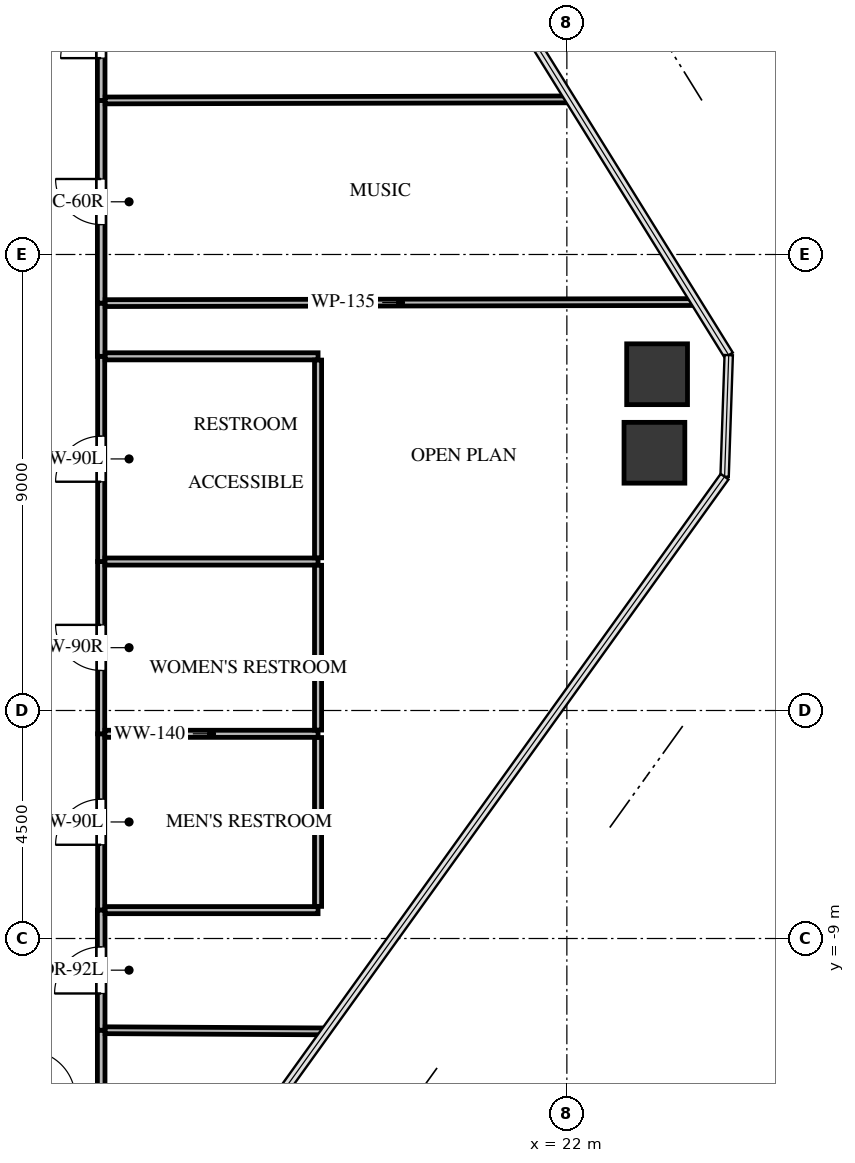
"""IFC4 building model, lengths in metres.
Left out: names, types, materials, properties, quantities, classifications, styles, units other than length and angle.
Written with IfcOpenShell. Run it as: python <this file> out.ifc"""

import sys

from ifc_helpers import new_model, si_unit, direction, frame, frame_2d, origin, origin_2d, place, context, subcontext, project, spatial, rectangle, extrude, source, transform, mapped, element, fill, save


model = new_model("IFC4")
c1 = context("Model", 3, precision=1e-05, world=origin(), true_north=direction((0.0, 1.0)))
c2 = subcontext(c1, "Body", "Model", "MODEL_VIEW")
j1 = project(units=[si_unit("LENGTHUNIT", "METRE"), si_unit("PLANEANGLEUNIT", "RADIAN")], contexts=[c1])
p1 = place(None, origin())
s1 = spatial("IfcSite", under=j1, at=p1, CompositionType="ELEMENT")
p2 = place(p1, origin())
s2 = spatial("IfcBuilding", under=s1, at=p2, CompositionType="ELEMENT")
p3 = place(p2, frame((0.0, 0.0, 123.9)))
s3 = spatial("IfcBuildingStorey", under=s2, at=p3, CompositionType="ELEMENT", Elevation=123.9)
m1 = source(origin(), c2, "Body", "SweptSolid", [
    extrude(rectangle(XDim=1.2, YDim=1.2, at=origin_2d()), origin(), (0.0, 0.0, 1.0), 3.3),
])
for number, where, z_axis, x_axis in (
    (1, (23.781, 2.137, -0.24), (0.0, 0.0, 1.0), (1.0, 0.0, 0.0)),
    (2, (23.728, 0.587, -0.24), (0.0, 0.0, 1.0), (1.0, 0.0, 0.0)),
):
    element("IfcColumn", number, at=place(p3, frame(where, z_axis=z_axis, x_axis=x_axis)), inside=s3, PredefinedType="COLUMN", context=c2, shape_type="MappedRepresentation", body=[
        mapped(m1, transform((0.0, 0.0, 0.0), x_axis=(1.0, 0.0, 0.0), y_axis=(0.0, 1.0, 0.0), z_axis=(0.0, 0.0, 1.0), scale=1.0)),
    ])
p4 = place(p3, frame((12.81, -8.44, 0.0), z_axis=(0.0, 0.0, 1.0), x_axis=(0.0, 1.0, 0.0)))
e3 = element("IfcWall", 3, at=p4, inside=s3, PredefinedType="PARTITIONING", context=c2, shape_type="SweptSolid", body=[
    extrude(rectangle(XDim=3.48, YDim=0.14, at=frame_2d((1.74, 0.0))), origin(), (0.0, 0.0, 1.0), 3.045),
])
p5 = place(p4, frame((1.29, 0.0, 0.0)))
e4 = element("IfcOpeningElement", 4, at=p5, cuts=e3, PredefinedType="OPENING", context=c2, shape_type="SweptSolid", body=[
    extrude(rectangle(XDim=0.9, YDim=2.05, at=frame_2d((0.45, 1.025))), frame((0.0, 0.08, 0.0), z_axis=(0.0, -1.0, 0.0), x_axis=(1.0, 0.0, 0.0)), (0.0, 0.0, 1.0), 0.16),
])
p6 = place(p3, frame((12.81, -4.96, 0.0), z_axis=(0.0, 0.0, 1.0), x_axis=(0.0, 1.0, 0.0)))
e5 = element("IfcWall", 5, at=p6, inside=s3, PredefinedType="PARTITIONING", context=c2, shape_type="SweptSolid", body=[
    extrude(rectangle(XDim=3.4, YDim=0.14, at=frame_2d((1.7, 0.0))), origin(), (0.0, 0.0, 1.0), 3.045),
])
p7 = place(p6, frame((1.25, 0.0, 0.0)))
e6 = element("IfcOpeningElement", 6, at=p7, cuts=e5, PredefinedType="OPENING", context=c2, shape_type="SweptSolid", body=[
    extrude(rectangle(XDim=0.9, YDim=2.05, at=frame_2d((0.45, 1.025))), frame((0.0, 0.08, 0.0), z_axis=(0.0, -1.0, 0.0), x_axis=(1.0, 0.0, 0.0)), (0.0, 0.0, 1.0), 0.16),
])
p8 = place(p3, frame((12.81, -1.56, 0.0), z_axis=(0.0, 0.0, 1.0), x_axis=(0.0, 1.0, 0.0)))
e7 = element("IfcWall", 7, at=p8, inside=s3, PredefinedType="PARTITIONING", context=c2, shape_type="SweptSolid", body=[
    extrude(rectangle(XDim=4.05, YDim=0.14, at=frame_2d((2.025, 0.0))), origin(), (0.0, 0.0, 1.0), 2.212),
])
p9 = place(p8, frame((1.575, 0.0, 0.0)))
e8 = element("IfcOpeningElement", 8, at=p9, cuts=e7, PredefinedType="OPENING", context=c2, shape_type="SweptSolid", body=[
    extrude(rectangle(XDim=0.9, YDim=2.05, at=frame_2d((0.45, 1.025))), frame((0.0, 0.08, 0.0), z_axis=(0.0, -1.0, 0.0), x_axis=(1.0, 0.0, 0.0)), (0.0, 0.0, 1.0), 0.16),
])
p10 = place(p3, frame((12.81, -12.081, 0.0), z_axis=(0.0, 0.0, 1.0), x_axis=(0.0, 1.0, 0.0)))
e9 = element("IfcWall", 9, at=p10, inside=s3, PredefinedType="PARTITIONING", context=c2, shape_type="SweptSolid", body=[
    extrude(rectangle(XDim=1.271, YDim=0.15, at=frame_2d((0.635, 0.0))), origin(), (0.0, 0.0, 1.0), 3.045),
])
p11 = place(p3, frame((12.81, -10.81, 0.0), z_axis=(0.0, 0.0, 1.0), x_axis=(0.0, 1.0, 0.0)))
e10 = element("IfcWall", 10, at=p11, inside=s3, PredefinedType="PARTITIONING", context=c2, shape_type="SweptSolid", body=[
    extrude(rectangle(XDim=2.37, YDim=0.15, at=frame_2d((1.185, 0.0))), origin(), (0.0, 0.0, 1.0), 3.045),
])
p12 = place(p11, frame((0.725, 0.0, 0.0)))
e11 = element("IfcOpeningElement", 11, at=p12, cuts=e10, PredefinedType="OPENING", context=c2, shape_type="SweptSolid", body=[
    extrude(rectangle(XDim=0.92, YDim=2.1, at=frame_2d((0.46, 1.05))), frame((0.0, 0.085, 0.0), z_axis=(0.0, -1.0, 0.0), x_axis=(1.0, 0.0, 0.0)), (0.0, 0.0, 1.0), 0.17),
])
p13 = place(p3, frame((12.81, 2.49, 0.0), z_axis=(0.0, 0.0, 1.0), x_axis=(0.0, 1.0, 0.0)))
e12 = element("IfcWall", 12, at=p13, inside=s3, PredefinedType="PARTITIONING", context=c2, shape_type="SweptSolid", body=[
    extrude(rectangle(XDim=1.05, YDim=0.15, at=frame_2d((0.525, 0.0))), origin(), (0.0, 0.0, 1.0), 3.045),
])
p14 = place(p3, frame((12.81, 3.54, 0.0), z_axis=(0.0, 0.0, 1.0), x_axis=(0.0, 1.0, 0.0)))
e13 = element("IfcWall", 13, at=p14, inside=s3, PredefinedType="PARTITIONING", context=c2, shape_type="SweptSolid", body=[
    extrude(rectangle(XDim=4.0, YDim=0.15, at=frame_2d((2.0, 0.0))), origin(), (0.0, 0.0, 1.0), 3.045),
])
p15 = place(p14, frame((1.55, 0.0, 0.0)))
e14 = element("IfcOpeningElement", 14, at=p15, cuts=e13, PredefinedType="OPENING", context=c2, shape_type="SweptSolid", body=[
    extrude(rectangle(XDim=0.9, YDim=2.05, at=frame_2d((0.45, 1.025))), frame((0.0, 0.085, 0.0), z_axis=(0.0, -1.0, 0.0), x_axis=(1.0, 0.0, 0.0)), (0.0, 0.0, 1.0), 0.17),
])
p16 = place(p3, frame((12.81, 7.54, 0.0), z_axis=(0.0, 0.0, 1.0), x_axis=(0.0, 1.0, 0.0)))
e15 = element("IfcWall", 15, at=p16, inside=s3, PredefinedType="PARTITIONING", context=c2, shape_type="SweptSolid", body=[
    extrude(rectangle(XDim=3.27, YDim=0.15, at=frame_2d((1.635, 0.0))), origin(), (0.0, 0.0, 1.0), 3.045),
])
p17 = place(p16, frame((0.835, 0.0, 0.0)))
e16 = element("IfcOpeningElement", 16, at=p17, cuts=e15, PredefinedType="OPENING", context=c2, shape_type="SweptSolid", body=[
    extrude(rectangle(XDim=1.6, YDim=2.15, at=frame_2d((0.8, 1.075))), frame((0.0, 0.085, 0.0), z_axis=(0.0, -1.0, 0.0), x_axis=(1.0, 0.0, 0.0)), (0.0, 0.0, 1.0), 0.17),
])
p18 = place(p3, frame((12.884, -4.96, 0.0), z_axis=(0.0, 0.0, 1.0), x_axis=(1.0, 0.0, 0.0)))
e17 = element("IfcWall", 17, at=p18, inside=s3, PredefinedType="PARTITIONING", context=c2, shape_type="SweptSolid", body=[
    extrude(rectangle(XDim=4.206, YDim=0.14, at=frame_2d((2.103, 0.0))), origin(), (0.0, 0.0, 1.0), 3.045),
])
p19 = place(p3, frame((17.09, -8.44, 0.0), z_axis=(0.0, 0.0, 1.0), x_axis=(-1.0, 0.0, 0.0)))
e18 = element("IfcWall", 18, at=p19, inside=s3, PredefinedType="PARTITIONING", context=c2, shape_type="SweptSolid", body=[
    extrude(rectangle(XDim=4.201, YDim=0.14, at=frame_2d((2.101, 0.0))), origin(), (0.0, 0.0, 1.0), 2.38),
])
p20 = place(p3, frame((17.09, -5.034, 0.0), z_axis=(0.0, 0.0, 1.0), x_axis=(0.0, -1.0, 0.0)))
e19 = element("IfcWall", 19, at=p20, inside=s3, PredefinedType="PARTITIONING", context=c2, shape_type="SweptSolid", body=[
    extrude(rectangle(XDim=3.332, YDim=0.14, at=frame_2d((1.666, 0.0))), origin(), (0.0, 0.0, 1.0), 2.38),
])
p21 = place(p3, frame((12.884, -1.56, 0.0), z_axis=(0.0, 0.0, 1.0), x_axis=(1.0, 0.0, 0.0)))
e20 = element("IfcWall", 20, at=p21, inside=s3, PredefinedType="PARTITIONING", context=c2, shape_type="SweptSolid", body=[
    extrude(rectangle(XDim=4.206, YDim=0.14, at=frame_2d((2.103, 0.0))), origin(), (0.0, 0.0, 1.0), 3.045),
])
p22 = place(p3, frame((17.09, -1.634, 0.0), z_axis=(0.0, 0.0, 1.0), x_axis=(0.0, -1.0, 0.0)))
e21 = element("IfcWall", 21, at=p22, inside=s3, PredefinedType="PARTITIONING", context=c2, shape_type="SweptSolid", body=[
    extrude(rectangle(XDim=3.252, YDim=0.14, at=frame_2d((1.626, 0.0))), origin(), (0.0, 0.0, 1.0), 3.045),
])
p23 = place(p3, frame((12.889, 2.49, 0.0), z_axis=(0.0, 0.0, 1.0), x_axis=(1.0, 0.0, 0.0)))
e22 = element("IfcWall", 22, at=p23, inside=s3, PredefinedType="PARTITIONING", context=c2, shape_type="SweptSolid", body=[
    extrude(rectangle(XDim=4.201, YDim=0.14, at=frame_2d((2.101, 0.0))), origin(), (0.0, 0.0, 1.0), 3.045),
])
p24 = place(p3, frame((17.09, 2.416, 0.0), z_axis=(0.0, 0.0, 1.0), x_axis=(0.0, -1.0, 0.0)))
e23 = element("IfcWall", 23, at=p24, inside=s3, PredefinedType="PARTITIONING", context=c2, shape_type="SweptSolid", body=[
    extrude(rectangle(XDim=3.902, YDim=0.14, at=frame_2d((1.951, 0.0))), origin(), (0.0, 0.0, 1.0), 2.212),
])
p25 = place(p3, frame((12.889, -10.81, 0.0), z_axis=(0.0, 0.0, 1.0), x_axis=(0.999986140562, -0.005264853658, 0.0)))
e24 = element("IfcWall", 24, at=p25, inside=s3, PredefinedType="PARTITIONING", context=c2, shape_type="SweptSolid", body=[
    extrude(rectangle(XDim=4.359, YDim=0.135, at=frame_2d((2.179, 0.0))), origin(), (0.0, 0.0, 1.0), 2.38),
])
p26 = place(p3, frame((12.889, 3.54, 0.0), z_axis=(0.0, 0.0, 1.0), x_axis=(0.999998377575, 0.001801345995, 0.0)))
e25 = element("IfcWall", 25, at=p26, inside=s3, PredefinedType="PARTITIONING", context=c2, shape_type="SweptSolid", body=[
    extrude(rectangle(XDim=11.656, YDim=0.135, at=frame_2d((5.828, 0.0))), origin(), (0.0, 0.0, 1.0), 2.38),
])
p27 = place(p3, frame((12.889, 7.54, 0.0), z_axis=(0.0, 0.0, 1.0), x_axis=(0.99999744191, 0.002261895808, 0.0)))
e26 = element("IfcWall", 26, at=p27, inside=s3, PredefinedType="PARTITIONING", context=c2, shape_type="SweptSolid", body=[
    extrude(rectangle(XDim=9.175, YDim=0.135, at=frame_2d((4.587, 0.0))), origin(), (0.0, 0.0, 1.0), 2.38),
])
m2 = source(origin(), c2, "Body", "SweptSolid", [
    extrude(rectangle(XDim=0.9, YDim=2.05, at=frame_2d((0.45, 1.025))), frame((0.0, 0.025, 0.0), z_axis=(0.0, -1.0, 0.0), x_axis=(1.0, 0.0, 0.0)), (0.0, 0.0, 1.0), 0.05),
])
p28 = place(p5, origin())
e27 = element("IfcDoor", 27, at=p28, inside=s3, OperationType="SINGLE_SWING_LEFT", PredefinedType="DOOR", context=c2, shape_type="MappedRepresentation", body=[
    mapped(m2, transform((0.0, 0.0, 0.0), x_axis=(1.0, 0.0, 0.0), y_axis=(0.0, 1.0, 0.0), z_axis=(0.0, 0.0, 1.0), scale=1.0)),
])
fill(e4, e27)
m3 = source(origin(), c2, "Body", "SweptSolid", [
    extrude(rectangle(XDim=0.9, YDim=2.05, at=frame_2d((0.45, 1.025))), frame((0.0, 0.025, 0.0), z_axis=(0.0, -1.0, 0.0), x_axis=(1.0, 0.0, 0.0)), (0.0, 0.0, 1.0), 0.05),
])
p29 = place(p7, origin())
e28 = element("IfcDoor", 28, at=p29, inside=s3, OperationType="SINGLE_SWING_RIGHT", PredefinedType="DOOR", context=c2, shape_type="MappedRepresentation", body=[
    mapped(m3, transform((0.0, 0.0, 0.0), x_axis=(1.0, 0.0, 0.0), y_axis=(0.0, 1.0, 0.0), z_axis=(0.0, 0.0, 1.0), scale=1.0)),
])
fill(e6, e28)
p30 = place(p9, origin())
e29 = element("IfcDoor", 29, at=p30, inside=s3, OperationType="SINGLE_SWING_LEFT", PredefinedType="DOOR", context=c2, shape_type="MappedRepresentation", body=[
    mapped(m2, transform((0.0, 0.0, 0.0), x_axis=(1.0, 0.0, 0.0), y_axis=(0.0, 1.0, 0.0), z_axis=(0.0, 0.0, 1.0), scale=1.0)),
])
fill(e8, e29)
m4 = source(origin(), c2, "Body", "SweptSolid", [
    extrude(rectangle(XDim=0.92, YDim=2.1, at=frame_2d((0.46, 1.05))), frame((0.0, 0.025, 0.0), z_axis=(0.0, -1.0, 0.0), x_axis=(1.0, 0.0, 0.0)), (0.0, 0.0, 1.0), 0.05),
])
p31 = place(p12, origin())
e30 = element("IfcDoor", 30, at=p31, inside=s3, OperationType="SINGLE_SWING_LEFT", PredefinedType="DOOR", context=c2, shape_type="MappedRepresentation", body=[
    mapped(m4, transform((0.0, 0.0, 0.0), x_axis=(1.0, 0.0, 0.0), y_axis=(0.0, 1.0, 0.0), z_axis=(0.0, 0.0, 1.0), scale=1.0)),
])
fill(e11, e30)
m5 = source(origin(), c2, "Body", "SweptSolid", [
    extrude(rectangle(XDim=0.9, YDim=2.05, at=frame_2d((0.45, 1.025))), frame((0.0, 0.025, 0.0), z_axis=(0.0, -1.0, 0.0), x_axis=(1.0, 0.0, 0.0)), (0.0, 0.0, 1.0), 0.05),
])
p32 = place(p15, origin())
e31 = element("IfcDoor", 31, at=p32, inside=s3, OperationType="SINGLE_SWING_RIGHT", PredefinedType="DOOR", context=c2, shape_type="MappedRepresentation", body=[
    mapped(m5, transform((0.0, 0.0, 0.0), x_axis=(1.0, 0.0, 0.0), y_axis=(0.0, 1.0, 0.0), z_axis=(0.0, 0.0, 1.0), scale=1.0)),
])
fill(e14, e31)
m6 = source(origin(), c2, "Body", "SweptSolid", [
    extrude(rectangle(XDim=1.6, YDim=2.15, at=frame_2d((0.8, 1.075))), frame((0.0, 0.025, 0.0), z_axis=(0.0, -1.0, 0.0), x_axis=(1.0, 0.0, 0.0)), (0.0, 0.0, 1.0), 0.05),
])
p33 = place(p17, origin())
e32 = element("IfcDoor", 32, at=p33, inside=s3, OperationType="DOUBLE_DOOR_SINGLE_SWING", PredefinedType="DOOR", context=c2, shape_type="MappedRepresentation", body=[
    mapped(m6, transform((0.0, 0.0, 0.0), x_axis=(1.0, 0.0, 0.0), y_axis=(0.0, 1.0, 0.0), z_axis=(0.0, 0.0, 1.0), scale=1.0)),
])
fill(e16, e32)
save(model, sys.argv[1])
